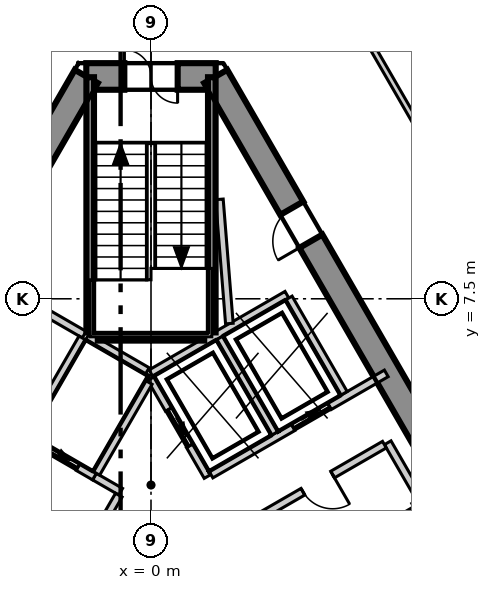
"""IFC4 building model, lengths in metres.
Left out: names, types, materials, properties, quantities, classifications, styles, units other than length and angle.
Written with IfcOpenShell. Run it as: python <this file> out.ifc"""

import sys

from ifc_helpers import new_model, si_unit, direction, frame, frame_2d, origin, place, context, subcontext, project, spatial, polyline, rectangle, outline, extrude, element, fill, save


model = new_model("IFC4")
c1 = context("Model", 3, precision=1e-05, world=origin(), true_north=direction((0.0, 1.0)))
c2 = subcontext(c1, "Body", "Model", "MODEL_VIEW")
j1 = project(units=[si_unit("LENGTHUNIT", "METRE"), si_unit("PLANEANGLEUNIT", "RADIAN")], contexts=[c1])
p1 = place(None, origin())
s1 = spatial("IfcSite", under=j1, at=p1, CompositionType="ELEMENT")
p2 = place(p1, origin())
s2 = spatial("IfcBuilding", under=s1, at=p2, CompositionType="ELEMENT")
p3 = place(p2, frame((0.0, 0.0, 227.3)))
s3 = spatial("IfcBuildingStorey", under=s2, at=p3, CompositionType="ELEMENT", Elevation=227.3)
p4 = place(p3, frame((1.703, 13.35, -0.3), z_axis=(0.0, 0.0, 1.0), x_axis=(-1.0, 0.0, 0.0)))
e1 = element("IfcWall", 1, at=p4, inside=s3, PredefinedType="SHEAR", context=c2, shape_type="SweptSolid", body=[
    extrude(outline(polyline([(-0.202, -0.35), (1.703, -0.35), (3.608, -0.35), (3.204, 0.35), (1.703, 0.35), (0.202, 0.35), (-0.202, -0.35)])), origin(), (0.0, 0.0, 1.0), 4.0),
])
p5 = place(p4, frame((1.003, 0.0, 0.3)))
e2 = element("IfcOpeningElement", 2, at=p5, cuts=e1, PredefinedType="OPENING", context=c2, shape_type="SweptSolid", body=[
    extrude(rectangle(XDim=1.4, YDim=2.1, at=frame_2d((0.7, 1.05))), frame((0.0, 0.36, 0.0), z_axis=(0.0, -1.0, 0.0), x_axis=(1.0, 0.0, 0.0)), (0.0, 0.0, 1.0), 0.72),
])
p6 = place(p3, frame((-1.703, 13.35, -0.3), z_axis=(0.0, 0.0, 1.0), x_axis=(-0.500011533395, -0.866018744874, 0.0)))
e3 = element("IfcWall", 3, at=p6, inside=s3, PredefinedType="SHEAR", context=c2, shape_type="SweptSolid", body=[
    extrude(outline(polyline([(-0.202, -0.35), (1.782, -0.35), (3.766, -0.35), (5.75, -0.35), (7.734, -0.35), (9.718, -0.35), (11.702, -0.35), (13.686, -0.35), (15.67, -0.35), (17.654, -0.35), (19.638, -0.35), (21.622, -0.35), (21.218, 0.35), (19.307, 0.35), (17.397, 0.35), (15.486, 0.35), (13.576, 0.35), (11.665, 0.35), (9.755, 0.35), (7.844, 0.35), (5.934, 0.35), (4.023, 0.35), (2.113, 0.35), (0.202, 0.35), (-0.202, -0.35)])), origin(), (0.0, 0.0, 1.0), 4.0),
])
p7 = place(p6, frame((10.16, 0.0, 0.3)))
e4 = element("IfcOpeningElement", 4, at=p7, cuts=e3, PredefinedType="OPENING", context=c2, shape_type="SweptSolid", body=[
    extrude(rectangle(XDim=1.1, YDim=2.1, at=frame_2d((0.55, 1.05))), frame((0.0, 0.36, 0.0), z_axis=(0.0, -1.0, 0.0), x_axis=(1.0, 0.0, 0.0)), (0.0, 0.0, 1.0), 0.72),
])
p8 = place(p6, frame((16.465, 0.0, 0.3)))
e5 = element("IfcOpeningElement", 5, at=p8, cuts=e3, PredefinedType="OPENING", context=c2, shape_type="SweptSolid", body=[
    extrude(rectangle(XDim=0.9, YDim=2.1, at=frame_2d((0.45, 1.05))), frame((0.0, 0.36, 0.0), z_axis=(0.0, -1.0, 0.0), x_axis=(1.0, 0.0, 0.0)), (0.0, 0.0, 1.0), 0.72),
])
p9 = place(p6, frame((4.055, 0.0, 0.3)))
e6 = element("IfcOpeningElement", 6, at=p9, cuts=e3, PredefinedType="OPENING", context=c2, shape_type="SweptSolid", body=[
    extrude(rectangle(XDim=0.9, YDim=2.1, at=frame_2d((0.45, 1.05))), frame((0.0, 0.36, 0.0), z_axis=(0.0, -1.0, 0.0), x_axis=(1.0, 0.0, 0.0)), (0.0, 0.0, 1.0), 0.72),
])
p10 = place(p3, frame((12.413, -5.2, -0.3), z_axis=(0.0, 0.0, 1.0), x_axis=(-0.500011533395, 0.866018744874, 0.0)))
e7 = element("IfcWall", 7, at=p10, inside=s3, PredefinedType="SHEAR", context=c2, shape_type="SweptSolid", body=[
    extrude(outline(polyline([(-0.202, -0.35), (1.782, -0.35), (3.766, -0.35), (5.75, -0.35), (7.734, -0.35), (9.718, -0.35), (11.702, -0.35), (13.686, -0.35), (15.67, -0.35), (17.654, -0.35), (19.638, -0.35), (21.622, -0.35), (21.218, 0.35), (19.307, 0.35), (17.397, 0.35), (15.486, 0.35), (13.576, 0.35), (11.665, 0.35), (9.755, 0.35), (7.844, 0.35), (5.934, 0.35), (4.023, 0.35), (2.113, 0.35), (0.202, 0.35), (-0.202, -0.35)])), origin(), (0.0, 0.0, 1.0), 4.0),
])
p11 = place(p10, frame((4.055, 0.0, 0.3)))
e8 = element("IfcOpeningElement", 8, at=p11, cuts=e7, PredefinedType="OPENING", context=c2, shape_type="SweptSolid", body=[
    extrude(rectangle(XDim=0.9, YDim=2.1, at=frame_2d((0.45, 1.05))), frame((0.0, 0.36, 0.0), z_axis=(0.0, -1.0, 0.0), x_axis=(1.0, 0.0, 0.0)), (0.0, 0.0, 1.0), 0.72),
])
p12 = place(p10, frame((16.415, 0.0, 0.3)))
e9 = element("IfcOpeningElement", 9, at=p12, cuts=e7, PredefinedType="OPENING", context=c2, shape_type="SweptSolid", body=[
    extrude(rectangle(XDim=1.0, YDim=2.1, at=frame_2d((0.5, 1.05))), frame((0.0, 0.36, 0.0), z_axis=(0.0, -1.0, 0.0), x_axis=(1.0, 0.0, 0.0)), (0.0, 0.0, 1.0), 0.72),
])
p13 = place(p3, frame((27.782, -12.884, 0.0), z_axis=(0.0, 0.0, 1.0), x_axis=(-0.500023345841, 0.866011924637, 0.0)))
e10 = element("IfcWall", 10, at=p13, inside=s3, PredefinedType="ELEMENTEDWALL", context=c2, shape_type="SweptSolid", body=[
    extrude(rectangle(XDim=50.078, YDim=0.2, at=frame_2d((25.039, 0.0))), origin(), (0.0, 0.0, 1.0), 3.7),
])
p14 = place(p13, frame((2.171, 0.0, 0.9)))
e11 = element("IfcOpeningElement", 11, at=p14, cuts=e10, PredefinedType="OPENING", context=c2, shape_type="SweptSolid", body=[
    extrude(rectangle(XDim=4.2, YDim=2.5, at=frame_2d((2.1, 1.25))), frame((0.0, 0.11, 0.0), z_axis=(0.0, -1.0, 0.0), x_axis=(1.0, 0.0, 0.0)), (0.0, 0.0, 1.0), 0.22),
])
p15 = place(p13, frame((8.108, 0.0, 0.9)))
e12 = element("IfcOpeningElement", 12, at=p15, cuts=e10, PredefinedType="OPENING", context=c2, shape_type="SweptSolid", body=[
    extrude(rectangle(XDim=4.2, YDim=2.5, at=frame_2d((2.1, 1.25))), frame((0.0, 0.11, 0.0), z_axis=(0.0, -1.0, 0.0), x_axis=(1.0, 0.0, 0.0)), (0.0, 0.0, 1.0), 0.22),
])
p16 = place(p13, frame((14.044, 0.0, 0.9)))
e13 = element("IfcOpeningElement", 13, at=p16, cuts=e10, PredefinedType="OPENING", context=c2, shape_type="SweptSolid", body=[
    extrude(rectangle(XDim=4.2, YDim=2.5, at=frame_2d((2.1, 1.25))), frame((0.0, 0.11, 0.0), z_axis=(0.0, -1.0, 0.0), x_axis=(1.0, 0.0, 0.0)), (0.0, 0.0, 1.0), 0.22),
])
p17 = place(p13, frame((19.981, 0.0, 0.9)))
e14 = element("IfcOpeningElement", 14, at=p17, cuts=e10, PredefinedType="OPENING", context=c2, shape_type="SweptSolid", body=[
    extrude(rectangle(XDim=4.2, YDim=2.5, at=frame_2d((2.1, 1.25))), frame((0.0, 0.11, 0.0), z_axis=(0.0, -1.0, 0.0), x_axis=(1.0, 0.0, 0.0)), (0.0, 0.0, 1.0), 0.22),
])
p18 = place(p13, frame((25.917, 0.0, 0.9)))
e15 = element("IfcOpeningElement", 15, at=p18, cuts=e10, PredefinedType="OPENING", context=c2, shape_type="SweptSolid", body=[
    extrude(rectangle(XDim=4.2, YDim=2.5, at=frame_2d((2.1, 1.25))), frame((0.0, 0.11, 0.0), z_axis=(0.0, -1.0, 0.0), x_axis=(1.0, 0.0, 0.0)), (0.0, 0.0, 1.0), 0.22),
])
p19 = place(p13, frame((31.854, 0.0, 0.9)))
e16 = element("IfcOpeningElement", 16, at=p19, cuts=e10, PredefinedType="OPENING", context=c2, shape_type="SweptSolid", body=[
    extrude(rectangle(XDim=4.2, YDim=2.5, at=frame_2d((2.1, 1.25))), frame((0.0, 0.11, 0.0), z_axis=(0.0, -1.0, 0.0), x_axis=(1.0, 0.0, 0.0)), (0.0, 0.0, 1.0), 0.22),
])
p20 = place(p13, frame((37.79, 0.0, 0.9)))
e17 = element("IfcOpeningElement", 17, at=p20, cuts=e10, PredefinedType="OPENING", context=c2, shape_type="SweptSolid", body=[
    extrude(rectangle(XDim=4.2, YDim=2.5, at=frame_2d((2.1, 1.25))), frame((0.0, 0.11, 0.0), z_axis=(0.0, -1.0, 0.0), x_axis=(1.0, 0.0, 0.0)), (0.0, 0.0, 1.0), 0.22),
])
p21 = place(p13, frame((43.727, 0.0, 0.9)))
e18 = element("IfcOpeningElement", 18, at=p21, cuts=e10, PredefinedType="OPENING", context=c2, shape_type="SweptSolid", body=[
    extrude(rectangle(XDim=4.2, YDim=2.5, at=frame_2d((2.1, 1.25))), frame((0.0, 0.11, 0.0), z_axis=(0.0, -1.0, 0.0), x_axis=(1.0, 0.0, 0.0)), (0.0, 0.0, 1.0), 0.22),
])
p22 = place(p3, frame((-20.882, -11.969, 0.0), z_axis=(0.0, 0.0, 1.0), x_axis=(0.499998738735, 0.866026131975, 0.0)))
e19 = element("IfcWall", 19, at=p22, inside=s3, PredefinedType="PARTITIONING", context=c2, shape_type="SweptSolid", body=[
    extrude(rectangle(XDim=41.764, YDim=0.15, at=frame_2d((20.882, 0.0))), origin(), (0.0, 0.0, 1.0), 3.7),
])
p23 = place(p22, frame((33.714, 0.0, 0.0)))
e20 = element("IfcOpeningElement", 20, at=p23, cuts=e19, PredefinedType="OPENING", context=c2, shape_type="SweptSolid", body=[
    extrude(rectangle(XDim=1.1, YDim=2.1, at=frame_2d((0.55, 1.05))), frame((0.0, 0.085, 0.0), z_axis=(0.0, -1.0, 0.0), x_axis=(1.0, 0.0, 0.0)), (0.0, 0.0, 1.0), 0.17),
])
p24 = place(p22, frame((23.293, 0.0, 0.0)))
e21 = element("IfcOpeningElement", 21, at=p24, cuts=e19, PredefinedType="OPENING", context=c2, shape_type="SweptSolid", body=[
    extrude(rectangle(XDim=1.0, YDim=2.1, at=frame_2d((0.5, 1.05))), frame((0.0, 0.085, 0.0), z_axis=(0.0, -1.0, 0.0), x_axis=(1.0, 0.0, 0.0)), (0.0, 0.0, 1.0), 0.17),
])
p25 = place(p22, frame((13.356, 0.0, 0.0)))
e22 = element("IfcOpeningElement", 22, at=p25, cuts=e19, PredefinedType="OPENING", context=c2, shape_type="SweptSolid", body=[
    extrude(rectangle(XDim=1.1, YDim=2.1, at=frame_2d((0.55, 1.05))), frame((0.0, 0.085, 0.0), z_axis=(0.0, -1.0, 0.0), x_axis=(1.0, 0.0, 0.0)), (0.0, 0.0, 1.0), 0.17),
])
p26 = place(p22, frame((18.556, 0.0, 0.0)))
e23 = element("IfcOpeningElement", 23, at=p26, cuts=e19, PredefinedType="OPENING", context=c2, shape_type="SweptSolid", body=[
    extrude(rectangle(XDim=0.9, YDim=2.1, at=frame_2d((0.45, 1.05))), frame((0.0, 0.085, 0.0), z_axis=(0.0, -1.0, 0.0), x_axis=(1.0, 0.0, 0.0)), (0.0, 0.0, 1.0), 0.17),
])
p27 = place(p22, frame((15.556, 0.0, 0.0)))
e24 = element("IfcOpeningElement", 24, at=p27, cuts=e19, PredefinedType="OPENING", context=c2, shape_type="SweptSolid", body=[
    extrude(rectangle(XDim=0.9, YDim=2.1, at=frame_2d((0.45, 1.05))), frame((0.0, 0.085, 0.0), z_axis=(0.0, -1.0, 0.0), x_axis=(1.0, 0.0, 0.0)), (0.0, 0.0, 1.0), 0.17),
])
p28 = place(p22, frame((3.883, 0.0, 0.0)))
e25 = element("IfcOpeningElement", 25, at=p28, cuts=e19, PredefinedType="OPENING", context=c2, shape_type="SweptSolid", body=[
    extrude(rectangle(XDim=1.1, YDim=2.1, at=frame_2d((0.55, 1.05))), frame((0.0, 0.085, 0.0), z_axis=(0.0, -1.0, 0.0), x_axis=(1.0, 0.0, 0.0)), (0.0, 0.0, 1.0), 0.17),
])
p29 = place(p3, frame((0.075, 24.07, 0.0), z_axis=(0.0, 0.0, 1.0), x_axis=(0.49999939571, -0.866025752671, 0.0)))
e26 = element("IfcWall", 26, at=p29, inside=s3, PredefinedType="PARTITIONING", context=c2, shape_type="SweptSolid", body=[
    extrude(rectangle(XDim=41.614, YDim=0.15, at=frame_2d((20.807, 0.0))), origin(), (0.0, 0.0, 1.0), 3.7),
])
p30 = place(p29, frame((36.714, 0.0, 0.0)))
e27 = element("IfcOpeningElement", 27, at=p30, cuts=e26, PredefinedType="OPENING", context=c2, shape_type="SweptSolid", body=[
    extrude(rectangle(XDim=1.1, YDim=2.1, at=frame_2d((0.55, 1.05))), frame((0.0, 0.085, 0.0), z_axis=(0.0, -1.0, 0.0), x_axis=(1.0, 0.0, 0.0)), (0.0, 0.0, 1.0), 0.17),
])
p31 = place(p29, frame((21.831, 0.0, 0.0)))
e28 = element("IfcOpeningElement", 28, at=p31, cuts=e26, PredefinedType="OPENING", context=c2, shape_type="SweptSolid", body=[
    extrude(rectangle(XDim=1.1, YDim=2.1, at=frame_2d((0.55, 1.05))), frame((0.0, 0.085, 0.0), z_axis=(0.0, -1.0, 0.0), x_axis=(1.0, 0.0, 0.0)), (0.0, 0.0, 1.0), 0.17),
])
p32 = place(p29, frame((30.631, 0.0, 0.0)))
e29 = element("IfcOpeningElement", 29, at=p32, cuts=e26, PredefinedType="OPENING", context=c2, shape_type="SweptSolid", body=[
    extrude(rectangle(XDim=0.9, YDim=2.1, at=frame_2d((0.45, 1.05))), frame((0.0, 0.085, 0.0), z_axis=(0.0, -1.0, 0.0), x_axis=(1.0, 0.0, 0.0)), (0.0, 0.0, 1.0), 0.17),
])
p33 = place(p29, frame((27.431, 0.0, 0.0)))
e30 = element("IfcOpeningElement", 30, at=p33, cuts=e26, PredefinedType="OPENING", context=c2, shape_type="SweptSolid", body=[
    extrude(rectangle(XDim=0.9, YDim=2.1, at=frame_2d((0.45, 1.05))), frame((0.0, 0.085, 0.0), z_axis=(0.0, -1.0, 0.0), x_axis=(1.0, 0.0, 0.0)), (0.0, 0.0, 1.0), 0.17),
])
p34 = place(p29, frame((24.631, 0.0, 0.0)))
e31 = element("IfcOpeningElement", 31, at=p34, cuts=e26, PredefinedType="OPENING", context=c2, shape_type="SweptSolid", body=[
    extrude(rectangle(XDim=1.0, YDim=2.1, at=frame_2d((0.5, 1.05))), frame((0.0, 0.085, 0.0), z_axis=(0.0, -1.0, 0.0), x_axis=(1.0, 0.0, 0.0)), (0.0, 0.0, 1.0), 0.17),
])
p35 = place(p29, frame((14.358, 0.0, 0.0)))
e32 = element("IfcOpeningElement", 32, at=p35, cuts=e26, PredefinedType="OPENING", context=c2, shape_type="SweptSolid", body=[
    extrude(rectangle(XDim=1.1, YDim=2.1, at=frame_2d((0.55, 1.05))), frame((0.0, 0.085, 0.0), z_axis=(0.0, -1.0, 0.0), x_axis=(1.0, 0.0, 0.0)), (0.0, 0.0, 1.0), 0.17),
])
p36 = place(p29, frame((3.885, 0.0, 0.0)))
e33 = element("IfcOpeningElement", 33, at=p36, cuts=e26, PredefinedType="OPENING", context=c2, shape_type="SweptSolid", body=[
    extrude(rectangle(XDim=1.1, YDim=2.1, at=frame_2d((0.55, 1.05))), frame((0.0, 0.085, 0.0), z_axis=(0.0, -1.0, 0.0), x_axis=(1.0, 0.0, 0.0)), (0.0, 0.0, 1.0), 0.17),
])
p37 = place(p3, frame((6.73, 17.509, 0.0), z_axis=(0.0, 0.0, 1.0), x_axis=(0.500011469263, -0.866018781901, 0.0)))
e34 = element("IfcWall", 34, at=p37, inside=s3, PredefinedType="PARTITIONING", context=c2, shape_type="SweptSolid", body=[
    extrude(rectangle(XDim=11.724, YDim=0.15, at=frame_2d((5.862, 0.0))), origin(), (0.0, 0.0, 1.0), 3.7),
])
p38 = place(p37, frame((5.349, 0.0, 0.0)))
e35 = element("IfcOpeningElement", 35, at=p38, cuts=e34, PredefinedType="OPENING", context=c2, shape_type="SweptSolid", body=[
    extrude(rectangle(XDim=1.0, YDim=2.1, at=frame_2d((0.5, 1.05))), frame((0.0, 0.085, 0.0), z_axis=(0.0, -1.0, 0.0), x_axis=(1.0, 0.0, 0.0)), (0.0, 0.0, 1.0), 0.17),
])
p39 = place(p3, frame((-0.002, 5.541, 0.0), z_axis=(0.0, 0.0, 1.0), x_axis=(0.86600155993, 0.500041296494, 0.0)))
e36 = element("IfcWall", 36, at=p39, inside=s3, PredefinedType="SOLIDWALL", context=c2, shape_type="SweptSolid", body=[
    extrude(rectangle(XDim=4.132, YDim=0.2, at=frame_2d((2.066, 0.0))), origin(), (0.0, 0.0, 1.0), 3.7),
])
p40 = place(p3, frame((0.0, 5.4, 0.0), z_axis=(0.0, 0.0, 1.0), x_axis=(0.500103862429, -0.865965430478, 0.0)))
e37 = element("IfcWall", 37, at=p40, inside=s3, PredefinedType="SOLIDWALL", context=c2, shape_type="SweptSolid", body=[
    extrude(rectangle(XDim=2.973, YDim=0.2, at=frame_2d((1.487, 0.0))), origin(), (0.0, 0.0, 1.0), 3.7),
])
p41 = place(p40, frame((0.937, 0.0, 0.0)))
e38 = element("IfcOpeningElement", 38, at=p41, cuts=e37, PredefinedType="OPENING", context=c2, shape_type="SweptSolid", body=[
    extrude(rectangle(XDim=1.1, YDim=2.1, at=frame_2d((0.55, 1.05))), frame((0.0, 0.11, 0.0), z_axis=(0.0, -1.0, 0.0), x_axis=(1.0, 0.0, 0.0)), (0.0, 0.0, 1.0), 0.22),
])
p42 = place(p3, frame((1.578, 2.874, 0.0), z_axis=(0.0, 0.0, 1.0), x_axis=(0.866045911672, 0.499964477614, 0.0)))
e39 = element("IfcWall", 39, at=p42, inside=s3, PredefinedType="SOLIDWALL", context=c2, shape_type="SweptSolid", body=[
    extrude(rectangle(XDim=5.327, YDim=0.2, at=frame_2d((2.663, 0.0))), origin(), (0.0, 0.0, 1.0), 3.7),
])
p43 = place(p42, frame((2.496, 0.0, 0.0)))
e40 = element("IfcOpeningElement", 40, at=p43, cuts=e39, PredefinedType="OPENING", context=c2, shape_type="SweptSolid", body=[
    extrude(rectangle(XDim=1.1, YDim=2.1, at=frame_2d((0.55, 1.05))), frame((0.0, 0.11, 0.0), z_axis=(0.0, -1.0, 0.0), x_axis=(1.0, 0.0, 0.0)), (0.0, 0.0, 1.0), 0.22),
])
for number, where, z_axis, x_axis in (
    (41, (3.626, 7.52, 0.0), (0.0, 0.0, 1.0), (0.5, -0.866, 0.0)),
    (42, (1.807, 6.47, 0.0), (0.0, 0.0, 1.0), (0.5, -0.866, 0.0)),
):
    element("IfcWall", number, at=place(p3, frame(where, z_axis=z_axis, x_axis=x_axis)), inside=s3, PredefinedType="SOLIDWALL", context=c2, shape_type="SweptSolid", body=[
        extrude(rectangle(XDim=2.9, YDim=0.2, at=frame_2d((1.45, 0.0))), origin(), (0.0, 0.0, 1.0), 3.7),
    ])
p44 = place(p3, frame((6.229, 3.712, 0.0), z_axis=(0.0, 0.0, 1.0), x_axis=(0.499875724984, -0.86609714211, 0.0)))
e43 = element("IfcWall", 43, at=p44, inside=s3, PredefinedType="SOLIDWALL", context=c2, shape_type="SweptSolid", body=[
    extrude(rectangle(XDim=1.701, YDim=0.2, at=frame_2d((0.85, 0.0))), origin(), (0.0, 0.0, 1.0), 3.7),
])
p45 = place(p3, frame((2.548, 1.587, 0.0), z_axis=(0.0, 0.0, 1.0), x_axis=(0.866004344652, 0.500036473714, 0.0)))
e44 = element("IfcWall", 44, at=p45, inside=s3, PredefinedType="SOLIDWALL", context=c2, shape_type="SweptSolid", body=[
    extrude(rectangle(XDim=4.15, YDim=0.2, at=frame_2d((2.075, 0.0))), origin(), (0.0, 0.0, 1.0), 3.7),
])
p46 = place(p45, frame((1.675, 0.0, 0.0)))
e45 = element("IfcOpeningElement", 45, at=p46, cuts=e44, PredefinedType="OPENING", context=c2, shape_type="SweptSolid", body=[
    extrude(rectangle(XDim=0.9, YDim=2.1, at=frame_2d((0.45, 1.05))), frame((0.0, 0.11, 0.0), z_axis=(0.0, -1.0, 0.0), x_axis=(1.0, 0.0, 0.0)), (0.0, 0.0, 1.0), 0.22),
])
p47 = place(p3, frame((-1.488, 2.822, 0.0), z_axis=(0.0, 0.0, 1.0), x_axis=(0.866236612152, -0.499633997809, 0.0)))
e46 = element("IfcWall", 46, at=p47, inside=s3, PredefinedType="SOLIDWALL", context=c2, shape_type="SweptSolid", body=[
    extrude(rectangle(XDim=0.796, YDim=0.2, at=frame_2d((0.398, 0.0))), origin(), (0.0, 0.0, 1.0), 3.7),
])
p48 = place(p3, frame((-3.489, 7.557, 0.0), z_axis=(0.0, 0.0, 1.0), x_axis=(0.866010750942, -0.50002537861, 0.0)))
e47 = element("IfcWall", 47, at=p48, inside=s3, PredefinedType="SOLIDWALL", context=c2, shape_type="SweptSolid", body=[
    extrude(rectangle(XDim=2.0, YDim=0.2, at=frame_2d((1.0, 0.0))), origin(), (0.0, 0.0, 1.0), 3.7),
])
p49 = place(p3, frame((-2.444, -0.433, 0.0), z_axis=(0.0, 0.0, 1.0), x_axis=(0.500035624827, 0.866004834804, 0.0)))
e48 = element("IfcWall", 48, at=p49, inside=s3, PredefinedType="SOLIDWALL", context=c2, shape_type="SweptSolid", body=[
    extrude(rectangle(XDim=3.194, YDim=0.2, at=frame_2d((1.597, 0.0))), origin(), (0.0, 0.0, 1.0), 3.7),
])
p50 = place(p3, frame((-3.309, 3.873, 0.0), z_axis=(0.0, 0.0, 1.0), x_axis=(0.866098583652, -0.499873227325, 0.0)))
e49 = element("IfcWall", 49, at=p50, inside=s3, PredefinedType="SOLIDWALL", context=c2, shape_type="SweptSolid", body=[
    extrude(rectangle(XDim=2.103, YDim=0.2, at=frame_2d((1.051, 0.0))), origin(), (0.0, 0.0, 1.0), 3.7),
])
p51 = place(p50, frame((0.502, 0.0, 0.0)))
e50 = element("IfcOpeningElement", 50, at=p51, cuts=e49, PredefinedType="OPENING", context=c2, shape_type="SweptSolid", body=[
    extrude(rectangle(XDim=1.1, YDim=2.1, at=frame_2d((0.55, 1.05))), frame((0.0, 0.11, 0.0), z_axis=(0.0, -1.0, 0.0), x_axis=(1.0, 0.0, 0.0)), (0.0, 0.0, 1.0), 0.22),
])
p52 = place(p3, frame((-3.257, 3.959, 0.0), z_axis=(0.0, 0.0, 1.0), x_axis=(0.50012328804, 0.865954211699, 0.0)))
e51 = element("IfcWall", 51, at=p52, inside=s3, PredefinedType="SOLIDWALL", context=c2, shape_type="SweptSolid", body=[
    extrude(rectangle(XDim=2.9, YDim=0.2, at=frame_2d((1.45, 0.0))), origin(), (0.0, 0.0, 1.0), 3.7),
])
p53 = place(p3, frame((-1.67, 6.507, 0.0), z_axis=(0.0, 0.0, 1.0), x_axis=(0.865941441609, -0.500145398563, 0.0)))
e52 = element("IfcWall", 52, at=p53, inside=s3, PredefinedType="SOLIDWALL", context=c2, shape_type="SweptSolid", body=[
    extrude(rectangle(XDim=1.815, YDim=0.2, at=frame_2d((0.908, 0.0))), origin(), (0.0, 0.0, 1.0), 3.7),
])
p54 = place(p3, frame((-1.438, 2.909, 0.0), z_axis=(0.0, 0.0, 1.0), x_axis=(0.499829630636, 0.866123744241, 0.0)))
e53 = element("IfcWall", 53, at=p54, inside=s3, PredefinedType="SOLIDWALL", context=c2, shape_type="SweptSolid", body=[
    extrude(rectangle(XDim=2.761, YDim=0.2, at=frame_2d((1.38, 0.0))), origin(), (0.0, 0.0, 1.0), 3.7),
])
p55 = place(p3, frame((1.8, 10.116, 0.0), z_axis=(0.0, 0.0, 1.0), x_axis=(0.079902085418, -0.996802717064, 0.0)))
e54 = element("IfcWall", 54, at=p55, inside=s3, PredefinedType="SOLIDWALL", context=c2, shape_type="SweptSolid", body=[
    extrude(rectangle(XDim=3.279, YDim=0.2, at=frame_2d((1.639, 0.0))), origin(), (0.0, 0.0, 1.0), 3.7),
])
p56 = place(p3, frame((6.826, 1.978, 0.0), z_axis=(0.0, 0.0, 1.0), x_axis=(0.499990139034, -0.866031096941, 0.0)))
e55 = element("IfcWall", 55, at=p56, inside=s3, PredefinedType="SOLIDWALL", context=c2, shape_type="SweptSolid", body=[
    extrude(rectangle(XDim=3.0, YDim=0.2, at=frame_2d((1.5, 0.0))), origin(), (0.0, 0.0, 1.0), 3.7),
])
p57 = place(p3, frame((1.6, 6.615, 0.0), z_axis=(0.0, 0.0, 1.0), x_axis=(0.0, 1.0, 0.0)))
e56 = element("IfcWall", 56, at=p57, inside=s3, PredefinedType="SOLIDWALL", context=c2, shape_type="SweptSolid", body=[
    extrude(rectangle(XDim=6.715, YDim=0.2, at=frame_2d((3.357, 0.0))), origin(), (0.0, 0.0, 1.0), 3.7),
])
p58 = place(p3, frame((-1.4, 6.5, 0.0), z_axis=(0.0, 0.0, 1.0), x_axis=(1.0, 0.0, 0.0)))
e57 = element("IfcWall", 57, at=p58, inside=s3, PredefinedType="SOLIDWALL", context=c2, shape_type="SweptSolid", body=[
    extrude(rectangle(XDim=2.8, YDim=0.2, at=frame_2d((1.4, 0.0))), origin(), (0.0, 0.0, 1.0), 3.7),
])
p59 = place(p3, frame((-1.6, 6.615, 0.0), z_axis=(0.0, 0.0, 1.0), x_axis=(0.0, 1.0, 0.0)))
e58 = element("IfcWall", 58, at=p59, inside=s3, PredefinedType="SOLIDWALL", context=c2, shape_type="SweptSolid", body=[
    extrude(rectangle(XDim=6.715, YDim=0.2, at=frame_2d((3.357, 0.0))), origin(), (0.0, 0.0, 1.0), 3.7),
])
p60 = place(p41, origin())
e59 = element("IfcDoor", 59, at=p60, inside=s3, OperationType="SLIDING_TO_LEFT", PredefinedType="DOOR", context=c2, shape_type="SweptSolid", body=[
    extrude(rectangle(XDim=1.1, YDim=2.1, at=frame_2d((0.55, 1.05))), frame((0.0, 0.025, 0.0), z_axis=(0.0, -1.0, 0.0), x_axis=(1.0, 0.0, 0.0)), (0.0, 0.0, 1.0), 0.05),
])
fill(e38, e59)
p61 = place(p43, origin())
e60 = element("IfcDoor", 60, at=p61, inside=s3, OperationType="SLIDING_TO_LEFT", PredefinedType="DOOR", context=c2, shape_type="SweptSolid", body=[
    extrude(rectangle(XDim=1.1, YDim=2.1, at=frame_2d((0.55, 1.05))), frame((0.0, 0.025, 0.0), z_axis=(0.0, -1.0, 0.0), x_axis=(1.0, 0.0, 0.0)), (0.0, 0.0, 1.0), 0.05),
])
fill(e40, e60)
p62 = place(p51, origin())
e61 = element("IfcDoor", 61, at=p62, inside=s3, OperationType="SLIDING_TO_LEFT", PredefinedType="DOOR", context=c2, shape_type="SweptSolid", body=[
    extrude(rectangle(XDim=1.1, YDim=2.1, at=frame_2d((0.55, 1.05))), frame((0.0, 0.025, 0.0), z_axis=(0.0, -1.0, 0.0), x_axis=(1.0, 0.0, 0.0)), (0.0, 0.0, 1.0), 0.05),
])
fill(e50, e61)
p63 = place(p5, origin())
e62 = element("IfcDoor", 62, at=p63, inside=s3, OperationType="DOUBLE_DOOR_SINGLE_SWING", PredefinedType="DOOR", context=c2, shape_type="SweptSolid", body=[
    extrude(rectangle(XDim=1.4, YDim=2.1, at=frame_2d((0.7, 1.05))), frame((0.0, 0.025, 0.0), z_axis=(0.0, -1.0, 0.0), x_axis=(1.0, 0.0, 0.0)), (0.0, 0.0, 1.0), 0.05),
])
fill(e2, e62)
p64 = place(p12, origin())
e63 = element("IfcDoor", 63, at=p64, inside=s3, OperationType="SINGLE_SWING_RIGHT", PredefinedType="DOOR", context=c2, shape_type="SweptSolid", body=[
    extrude(rectangle(XDim=1.0, YDim=2.1, at=frame_2d((0.5, 1.05))), frame((0.0, 0.025, 0.0), z_axis=(0.0, -1.0, 0.0), x_axis=(1.0, 0.0, 0.0)), (0.0, 0.0, 1.0), 0.05),
])
fill(e9, e63)
p65 = place(p46, origin())
e64 = element("IfcDoor", 64, at=p65, inside=s3, OperationType="SINGLE_SWING_RIGHT", PredefinedType="DOOR", context=c2, shape_type="SweptSolid", body=[
    extrude(rectangle(XDim=0.9, YDim=2.1, at=frame_2d((0.45, 1.05))), frame((0.0, 0.025, 0.0), z_axis=(0.0, -1.0, 0.0), x_axis=(1.0, 0.0, 0.0)), (0.0, 0.0, 1.0), 0.05),
])
fill(e45, e64)
save(model, sys.argv[1])
